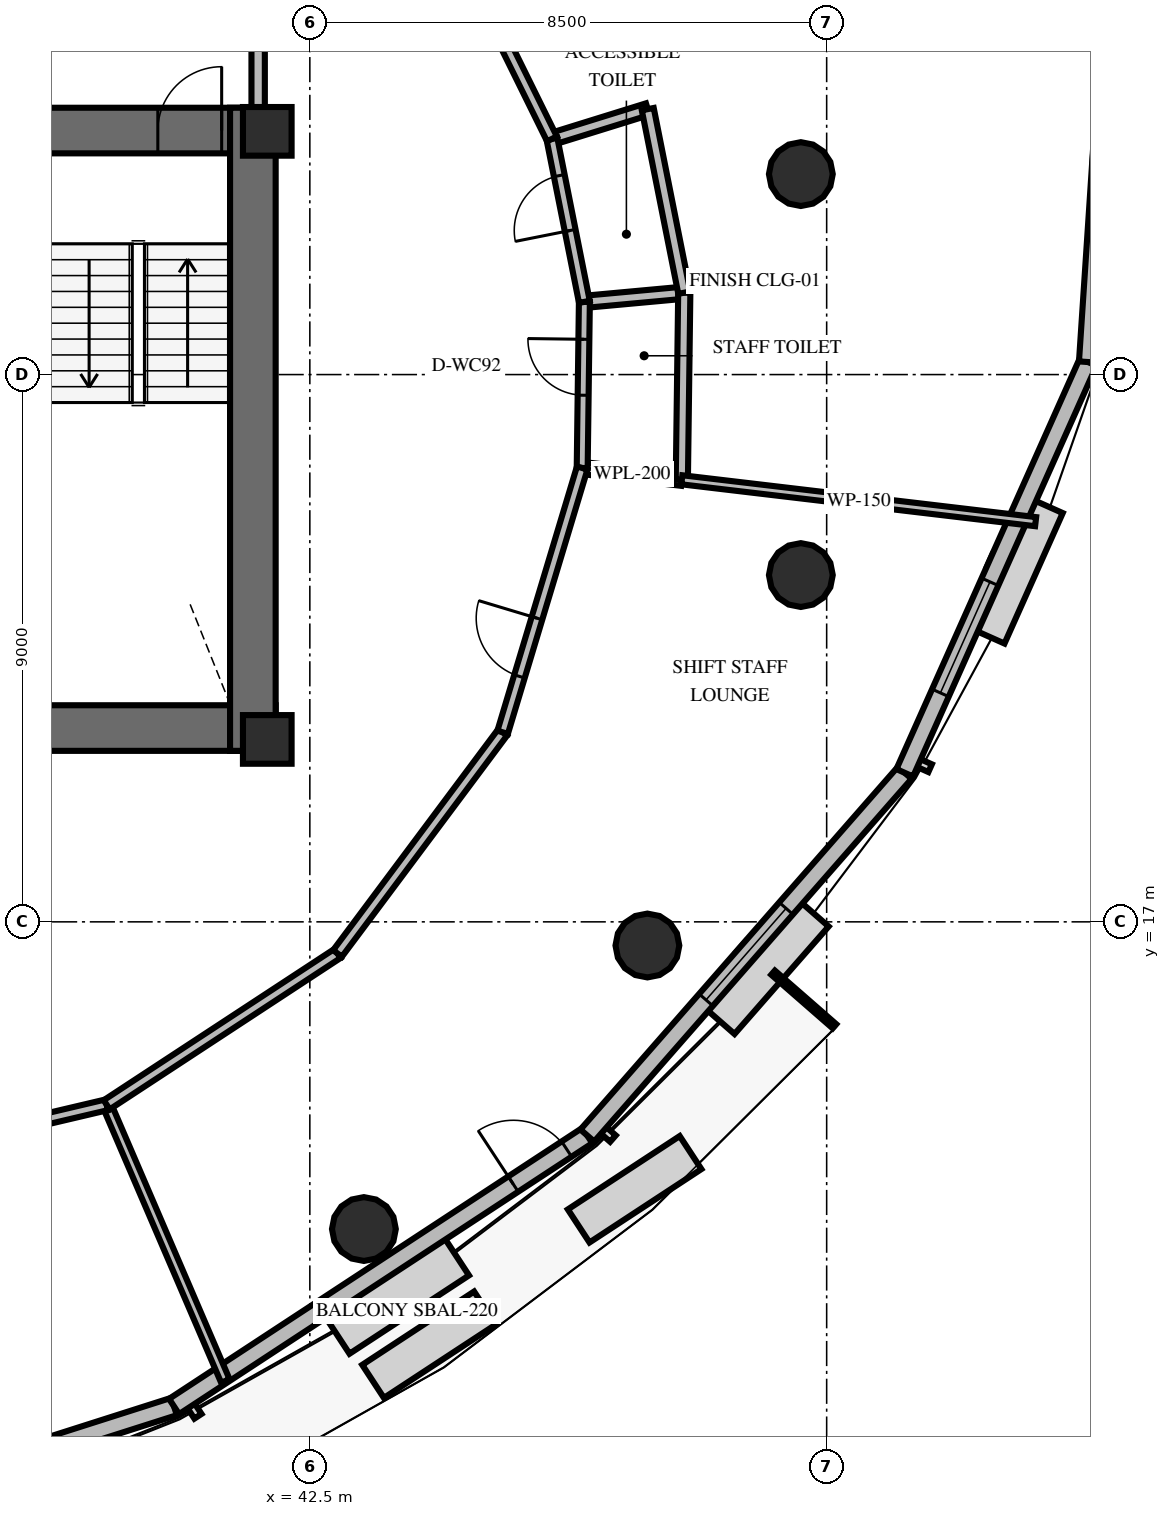
"""IFC4 building model, lengths in metres.
Left out: names, types, materials, properties, quantities, classifications, styles, units other than length and angle.
Written with IfcOpenShell. Run it as: python <this file> out.ifc"""

import sys

from ifc_helpers import new_model, si_unit, direction, frame, frame_2d, origin, origin_2d, place, context, subcontext, project, spatial, rectangle, circle, extrude, element, fill, save


model = new_model("IFC4")
c1 = context("Model", 3, precision=1e-05, world=origin(), true_north=direction((0.0, 1.0)))
c2 = subcontext(c1, "Body", "Model", "MODEL_VIEW")
j1 = project(units=[si_unit("LENGTHUNIT", "METRE"), si_unit("PLANEANGLEUNIT", "RADIAN")], contexts=[c1])
p1 = place(None, origin())
s1 = spatial("IfcSite", under=j1, at=p1, CompositionType="ELEMENT")
p2 = place(p1, origin())
s2 = spatial("IfcBuilding", under=s1, at=p2, CompositionType="ELEMENT")
p3 = place(p2, frame((0.0, 0.0, 173.6)))
s3 = spatial("IfcBuildingStorey", under=s2, at=p3, CompositionType="ELEMENT", Elevation=173.6)
p4 = place(p3, frame((26.072, 20.187, 0.0), z_axis=(0.0, 0.0, 1.0), x_axis=(1.0, 0.0, 0.0)))
e1 = element("IfcWall", 1, at=p4, inside=s3, PredefinedType="SHEAR", context=c2, shape_type="SweptSolid", body=[
    extrude(rectangle(XDim=15.866, YDim=0.75, at=frame_2d((7.933, 0.0))), origin(), (0.0, 0.0, 1.0), 3.6),
])
p5 = place(p3, frame((26.072, 30.013, 0.0), z_axis=(0.0, 0.0, 1.0), x_axis=(1.0, 0.0, 0.0)))
e2 = element("IfcWall", 2, at=p5, inside=s3, PredefinedType="SHEAR", context=c2, shape_type="SweptSolid", body=[
    extrude(rectangle(XDim=15.866, YDim=0.75, at=frame_2d((7.933, 0.0))), origin(), (0.0, 0.0, 1.0), 3.6),
])
p6 = place(p5, frame((0.878, 0.0, 0.0)))
e3 = element("IfcOpeningElement", 3, at=p6, cuts=e2, PredefinedType="OPENING", context=c2, shape_type="SweptSolid", body=[
    extrude(rectangle(XDim=1.05, YDim=2.15, at=frame_2d((0.525, 1.075))), frame((0.0, 0.385, 0.0), z_axis=(0.0, -1.0, 0.0), x_axis=(1.0, 0.0, 0.0)), (0.0, 0.0, 1.0), 0.77),
])
p7 = place(p5, frame((13.928, 0.0, 0.0)))
e4 = element("IfcOpeningElement", 4, at=p7, cuts=e2, PredefinedType="OPENING", context=c2, shape_type="SweptSolid", body=[
    extrude(rectangle(XDim=1.05, YDim=2.15, at=frame_2d((0.525, 1.075))), frame((0.0, 0.385, 0.0), z_axis=(0.0, -1.0, 0.0), x_axis=(1.0, 0.0, 0.0)), (0.0, 0.0, 1.0), 0.77),
])
p8 = place(p5, frame((7.378, 0.0, 0.0)))
e5 = element("IfcOpeningElement", 5, at=p8, cuts=e2, PredefinedType="OPENING", context=c2, shape_type="SweptSolid", body=[
    extrude(rectangle(XDim=1.1, YDim=2.15, at=frame_2d((0.55, 1.075))), frame((0.0, 0.385, 0.0), z_axis=(0.0, -1.0, 0.0), x_axis=(1.0, 0.0, 0.0)), (0.0, 0.0, 1.0), 0.77),
])
p9 = place(p3, frame((41.563, 19.812, 0.0), z_axis=(0.0, 0.0, 1.0), x_axis=(0.0, 1.0, 0.0)))
e6 = element("IfcWall", 6, at=p9, inside=s3, PredefinedType="SHEAR", context=c2, shape_type="SweptSolid", body=[
    extrude(rectangle(XDim=10.576, YDim=0.75, at=frame_2d((5.288, 0.0))), origin(), (0.0, 0.0, 1.0), 3.6),
])
for number, where, z_axis, x_axis in (
    (7, (41.8, 20.0, 0.0), (0.0, 0.0, 1.0), (1.0, 0.0, 0.0)),
    (8, (41.8, 30.0, 0.0), (0.0, 0.0, 1.0), (1.0, 0.0, 0.0)),
):
    element("IfcColumn", number, at=place(p3, frame(where, z_axis=z_axis, x_axis=x_axis)), inside=s3, PredefinedType="PILASTER", context=c2, shape_type="SweptSolid", body=[
        extrude(rectangle(XDim=0.8, YDim=0.8, at=origin_2d()), origin(), (0.0, 0.0, 1.0), 3.6),
    ])
for number, where, z_axis, x_axis in (
    (9, (50.575, 29.297, 0.0), (0.0, 0.0, 1.0), (1.0, 0.0, 0.0)),
    (10, (43.389, 11.948, 0.0), (0.0, 0.0, 1.0), (1.0, 0.0, 0.0)),
    (11, (48.052, 16.611, 0.0), (0.0, 0.0, 1.0), (1.0, 0.0, 0.0)),
    (12, (50.575, 22.703, 0.0), (0.0, 0.0, 1.0), (1.0, 0.0, 0.0)),
):
    element("IfcColumn", number, at=place(p3, frame(where, z_axis=z_axis, x_axis=x_axis)), inside=s3, PredefinedType="COLUMN", context=c2, shape_type="SweptSolid", body=[
        extrude(circle(Radius=0.525, at=origin_2d()), origin(), (0.0, 0.0, 1.0), 3.6),
    ])
p10 = place(p3, frame((32.715, 6.621, 0.0), z_axis=(0.0, 0.0, 1.0), x_axis=(0.952705891998, 0.303893868566, 0.0)))
e13 = element("IfcWall", 13, at=p10, inside=s3, PredefinedType="SOLIDWALL", context=c2, shape_type="SweptSolid", body=[
    extrude(rectangle(XDim=7.927, YDim=0.3, at=frame_2d((3.963, 0.0))), origin(), (0.0, 0.0, 1.0), 2.66),
])
p11 = place(p10, frame((2.964, 0.0, 0.8)))
e14 = element("IfcOpeningElement", 14, at=p11, cuts=e13, PredefinedType="OPENING", context=c2, shape_type="SweptSolid", body=[
    extrude(rectangle(XDim=2.0, YDim=1.85, at=frame_2d((1.0, 0.925))), frame((0.0, 0.16, 0.0), z_axis=(0.0, -1.0, 0.0), x_axis=(1.0, 0.0, 0.0)), (0.0, 0.0, 1.0), 0.32),
])
p12 = place(p3, frame((40.267, 9.03, 0.0), z_axis=(0.0, 0.0, 1.0), x_axis=(0.836291563278, 0.54828498173, 0.0)))
e15 = element("IfcWall", 15, at=p12, inside=s3, PredefinedType="SOLIDWALL", context=c2, shape_type="SweptSolid", body=[
    extrude(rectangle(XDim=8.127, YDim=0.3, at=frame_2d((4.063, 0.0))), origin(), (0.0, 0.0, 1.0), 2.66),
])
p13 = place(p12, frame((6.67, 0.0, 0.0)))
e16 = element("IfcOpeningElement", 16, at=p13, cuts=e15, PredefinedType="OPENING", context=c2, shape_type="SweptSolid", body=[
    extrude(rectangle(XDim=1.05, YDim=2.15, at=frame_2d((0.525, 1.075))), frame((0.0, 0.16, 0.0), z_axis=(0.0, -1.0, 0.0), x_axis=(1.0, 0.0, 0.0)), (0.0, 0.0, 1.0), 0.32),
])
p14 = place(p3, frame((47.063, 13.486, 0.0), z_axis=(0.0, 0.0, 1.0), x_axis=(0.658594000486, 0.752498466792, 0.0)))
e17 = element("IfcWall", 17, at=p14, inside=s3, PredefinedType="SOLIDWALL", context=c2, shape_type="SweptSolid", body=[
    extrude(rectangle(XDim=7.927, YDim=0.3, at=frame_2d((3.963, 0.0))), origin(), (0.0, 0.0, 1.0), 2.66),
])
p15 = place(p14, frame((2.964, 0.0, 0.8)))
e18 = element("IfcOpeningElement", 18, at=p15, cuts=e17, PredefinedType="OPENING", context=c2, shape_type="SweptSolid", body=[
    extrude(rectangle(XDim=2.0, YDim=1.85, at=frame_2d((1.0, 0.925))), frame((0.0, 0.16, 0.0), z_axis=(0.0, -1.0, 0.0), x_axis=(1.0, 0.0, 0.0)), (0.0, 0.0, 1.0), 0.32),
])
p16 = place(p3, frame((52.284, 19.451, 0.0), z_axis=(0.0, 0.0, 1.0), x_axis=(0.407577130337, 0.913170785136, 0.0)))
e19 = element("IfcWall", 19, at=p16, inside=s3, PredefinedType="SOLIDWALL", context=c2, shape_type="SweptSolid", body=[
    extrude(rectangle(XDim=7.398, YDim=0.3, at=frame_2d((3.699, 0.0))), origin(), (0.0, 0.0, 1.0), 2.66),
])
p17 = place(p16, frame((1.439, 0.0, 0.8)))
e20 = element("IfcOpeningElement", 20, at=p17, cuts=e19, PredefinedType="OPENING", context=c2, shape_type="SweptSolid", body=[
    extrude(rectangle(XDim=2.0, YDim=1.85, at=frame_2d((1.0, 0.925))), frame((0.0, 0.16, 0.0), z_axis=(0.0, -1.0, 0.0), x_axis=(1.0, 0.0, 0.0)), (0.0, 0.0, 1.0), 0.32),
])
p18 = place(p3, frame((55.299, 26.206, 0.0), z_axis=(0.0, 0.0, 1.0), x_axis=(0.066168247178, 0.997808480153, 0.0)))
e21 = element("IfcWall", 21, at=p18, inside=s3, PredefinedType="SOLIDWALL", context=c2, shape_type="SweptSolid", body=[
    extrude(rectangle(XDim=6.745, YDim=0.3, at=frame_2d((3.373, 0.0))), origin(), (0.0, 0.0, 1.0), 2.66),
])
p19 = place(p18, frame((2.372, 0.0, 0.8)))
e22 = element("IfcOpeningElement", 22, at=p19, cuts=e21, PredefinedType="OPENING", context=c2, shape_type="SweptSolid", body=[
    extrude(rectangle(XDim=2.0, YDim=1.85, at=frame_2d((1.0, 0.925))), frame((0.0, 0.16, 0.0), z_axis=(0.0, -1.0, 0.0), x_axis=(1.0, 0.0, 0.0)), (0.0, 0.0, 1.0), 0.32),
])
p20 = place(p3, frame((41.65, 30.05, 0.0), z_axis=(0.0, 0.0, 1.0), x_axis=(0.0, 1.0, 0.0)))
e23 = element("IfcWall", 23, at=p20, inside=s3, PredefinedType="SOLIDWALL", context=c2, shape_type="SweptSolid", body=[
    extrude(rectangle(XDim=4.38, YDim=0.22, at=frame_2d((2.19, 0.0))), origin(), (0.0, 0.0, 1.0), 2.46),
])
for number, where, z_axis, x_axis in (
    (24, (46.979, 24.464, 0.0), (0.0, 0.0, 1.0), (0.993, -0.118, 0.0)),
    (25, (47.015, 27.196, 0.0), (0.0, 0.0, 1.0), (0.996, 0.092, 0.0)),
):
    element("IfcWall", number, at=place(p3, frame(where, z_axis=z_axis, x_axis=x_axis)), inside=s3, PredefinedType="PLUMBINGWALL", context=c2, shape_type="SweptSolid", body=[
        extrude(rectangle(XDim=1.65, YDim=0.2, at=frame_2d((0.825, 0.0))), origin(), (0.0, 0.0, 1.0), 2.46),
    ])
p21 = place(p3, frame((48.618, 24.27, 0.0), z_axis=(0.0, 0.0, 1.0), x_axis=(0.013089960589, 0.999914322796, 0.0)))
e26 = element("IfcWall", 26, at=p21, inside=s3, PredefinedType="PLUMBINGWALL", context=c2, shape_type="SweptSolid", body=[
    extrude(rectangle(XDim=3.077, YDim=0.2, at=frame_2d((1.539, 0.0))), origin(), (0.0, 0.0, 1.0), 2.46),
])
p22 = place(p3, frame((46.979, 24.464, 0.0), z_axis=(0.0, 0.0, 1.0), x_axis=(0.013046253309, 0.999914894016, 0.0)))
e27 = element("IfcWall", 27, at=p22, inside=s3, PredefinedType="PARTITIONING", context=c2, shape_type="SweptSolid", body=[
    extrude(rectangle(XDim=2.732, YDim=0.18, at=frame_2d((1.366, 0.0))), origin(), (0.0, 0.0, 1.0), 2.46),
])
p23 = place(p22, frame((1.197, 0.0, 0.0)))
e28 = element("IfcOpeningElement", 28, at=p23, cuts=e27, PredefinedType="OPENING", context=c2, shape_type="SweptSolid", body=[
    extrude(rectangle(XDim=0.92, YDim=2.1, at=frame_2d((0.46, 1.05))), frame((0.0, 0.1, 0.0), z_axis=(0.0, -1.0, 0.0), x_axis=(1.0, 0.0, 0.0)), (0.0, 0.0, 1.0), 0.2),
])
p24 = place(p3, frame((46.482, 29.876, 0.0), z_axis=(0.0, 0.0, 1.0), x_axis=(0.955020793809, 0.296538839602, 0.0)))
e29 = element("IfcWall", 29, at=p24, inside=s3, PredefinedType="PLUMBINGWALL", context=c2, shape_type="SweptSolid", body=[
    extrude(rectangle(XDim=1.65, YDim=0.2, at=frame_2d((0.825, 0.0))), origin(), (0.0, 0.0, 1.0), 2.46),
])
p25 = place(p3, frame((48.658, 27.347, 0.0), z_axis=(0.0, 0.0, 1.0), x_axis=(-0.195093780369, 0.980784592488, 0.0)))
e30 = element("IfcWall", 30, at=p25, inside=s3, PredefinedType="PLUMBINGWALL", context=c2, shape_type="SweptSolid", body=[
    extrude(rectangle(XDim=3.077, YDim=0.2, at=frame_2d((1.539, 0.0))), origin(), (0.0, 0.0, 1.0), 2.46),
])
p26 = place(p3, frame((47.015, 27.196, 0.0), z_axis=(0.0, 0.0, 1.0), x_axis=(-0.195050694418, 0.98079316199, 0.0)))
e31 = element("IfcWall", 31, at=p26, inside=s3, PredefinedType="PARTITIONING", context=c2, shape_type="SweptSolid", body=[
    extrude(rectangle(XDim=2.732, YDim=0.18, at=frame_2d((1.366, 0.0))), origin(), (0.0, 0.0, 1.0), 2.46),
])
p27 = place(p26, frame((1.197, 0.0, 0.0)))
e32 = element("IfcOpeningElement", 32, at=p27, cuts=e31, PredefinedType="OPENING", context=c2, shape_type="SweptSolid", body=[
    extrude(rectangle(XDim=0.92, YDim=2.1, at=frame_2d((0.46, 1.05))), frame((0.0, 0.1, 0.0), z_axis=(0.0, -1.0, 0.0), x_axis=(1.0, 0.0, 0.0)), (0.0, 0.0, 1.0), 0.2),
])
p28 = place(p3, frame((48.618, 24.27, 0.0), z_axis=(0.0, 0.0, 1.0), x_axis=(0.993073026806, -0.117498780548, 0.0)))
e33 = element("IfcWall", 33, at=p28, inside=s3, PredefinedType="PARTITIONING", context=c2, shape_type="SweptSolid", body=[
    extrude(rectangle(XDim=5.859, YDim=0.15, at=frame_2d((2.93, 0.0))), origin(), (0.0, 0.0, 1.0), 2.46),
])
p29 = place(p3, frame((46.482, 29.876, 0.0), z_axis=(0.0, 0.0, 1.0), x_axis=(-0.442287221149, 0.896873465996, 0.0)))
e34 = element("IfcWall", 34, at=p29, inside=s3, PredefinedType="PARTITIONING", context=c2, shape_type="SweptSolid", body=[
    extrude(rectangle(XDim=4.089, YDim=0.18, at=frame_2d((2.044, 0.0))), origin(), (0.0, 0.0, 1.0), 2.46),
])
p30 = place(p3, frame((39.159, 13.991, 0.0), z_axis=(0.0, 0.0, 1.0), x_axis=(0.394765555281, -0.918781887264, 0.0)))
e35 = element("IfcWall", 35, at=p30, inside=s3, PredefinedType="PARTITIONING", context=c2, shape_type="SweptSolid", body=[
    extrude(rectangle(XDim=4.943, YDim=0.15, at=frame_2d((2.472, 0.0))), origin(), (0.0, 0.0, 1.0), 2.46),
])
p31 = place(p3, frame((34.741, 12.951, 0.0), z_axis=(0.0, 0.0, 1.0), x_axis=(0.973370592217, 0.229237192022, 0.0)))
e36 = element("IfcWall", 36, at=p31, inside=s3, PredefinedType="PARTITIONING", context=c2, shape_type="SweptSolid", body=[
    extrude(rectangle(XDim=4.539, YDim=0.18, at=frame_2d((2.27, 0.0))), origin(), (0.0, 0.0, 1.0), 2.46),
])
p32 = place(p3, frame((39.159, 13.991, 0.0), z_axis=(0.0, 0.0, 1.0), x_axis=(0.836295307945, 0.548279269998, 0.0)))
e37 = element("IfcWall", 37, at=p32, inside=s3, PredefinedType="PARTITIONING", context=c2, shape_type="SweptSolid", body=[
    extrude(rectangle(XDim=4.539, YDim=0.18, at=frame_2d((2.27, 0.0))), origin(), (0.0, 0.0, 1.0), 2.46),
])
p33 = place(p3, frame((42.955, 16.48, 0.0), z_axis=(0.0, 0.0, 1.0), x_axis=(0.598320542487, 0.80125684299, 0.0)))
e38 = element("IfcWall", 38, at=p33, inside=s3, PredefinedType="PARTITIONING", context=c2, shape_type="SweptSolid", body=[
    extrude(rectangle(XDim=4.539, YDim=0.18, at=frame_2d((2.27, 0.0))), origin(), (0.0, 0.0, 1.0), 2.46),
])
p34 = place(p3, frame((45.671, 20.117, 0.0), z_axis=(0.0, 0.0, 1.0), x_axis=(0.288226064997, 0.957562392461, 0.0)))
e39 = element("IfcWall", 39, at=p34, inside=s3, PredefinedType="PARTITIONING", context=c2, shape_type="SweptSolid", body=[
    extrude(rectangle(XDim=4.539, YDim=0.18, at=frame_2d((2.27, 0.0))), origin(), (0.0, 0.0, 1.0), 2.46),
])
p35 = place(p34, frame((0.96, 0.0, 0.0)))
e40 = element("IfcOpeningElement", 40, at=p35, cuts=e39, PredefinedType="OPENING", context=c2, shape_type="SweptSolid", body=[
    extrude(rectangle(XDim=1.0, YDim=2.15, at=frame_2d((0.5, 1.075))), frame((0.0, 0.1, 0.0), z_axis=(0.0, -1.0, 0.0), x_axis=(1.0, 0.0, 0.0)), (0.0, 0.0, 1.0), 0.2),
])
p36 = place(p13, origin())
e41 = element("IfcDoor", 41, at=p36, inside=s3, OperationType="SINGLE_SWING_LEFT", PredefinedType="DOOR", context=c2, shape_type="SweptSolid", body=[
    extrude(rectangle(XDim=1.05, YDim=2.15, at=frame_2d((0.525, 1.075))), frame((0.0, 0.025, 0.0), z_axis=(0.0, -1.0, 0.0), x_axis=(1.0, 0.0, 0.0)), (0.0, 0.0, 1.0), 0.05),
])
fill(e16, e41)
p37 = place(p15, origin())
e42 = element("IfcWindow", 42, at=p37, inside=s3, PartitioningType="SINGLE_PANEL", PredefinedType="WINDOW", context=c2, shape_type="SweptSolid", body=[
    extrude(rectangle(XDim=2.0, YDim=1.85, at=frame_2d((1.0, 0.925))), frame((0.0, 0.03, 0.0), z_axis=(0.0, -1.0, 0.0), x_axis=(1.0, 0.0, 0.0)), (0.0, 0.0, 1.0), 0.06),
])
fill(e18, e42)
p38 = place(p17, origin())
e43 = element("IfcWindow", 43, at=p38, inside=s3, PartitioningType="SINGLE_PANEL", PredefinedType="WINDOW", context=c2, shape_type="SweptSolid", body=[
    extrude(rectangle(XDim=2.0, YDim=1.85, at=frame_2d((1.0, 0.925))), frame((0.0, 0.03, 0.0), z_axis=(0.0, -1.0, 0.0), x_axis=(1.0, 0.0, 0.0)), (0.0, 0.0, 1.0), 0.06),
])
fill(e20, e43)
p39 = place(p7, origin())
e44 = element("IfcDoor", 44, at=p39, inside=s3, OperationType="SINGLE_SWING_RIGHT", PredefinedType="DOOR", context=c2, shape_type="SweptSolid", body=[
    extrude(rectangle(XDim=1.05, YDim=2.15, at=frame_2d((0.525, 1.075))), frame((0.0, 0.025, 0.0), z_axis=(0.0, -1.0, 0.0), x_axis=(1.0, 0.0, 0.0)), (0.0, 0.0, 1.0), 0.05),
])
fill(e4, e44)
p40 = place(p23, origin())
e45 = element("IfcDoor", 45, at=p40, inside=s3, OperationType="SINGLE_SWING_RIGHT", PredefinedType="DOOR", context=c2, shape_type="SweptSolid", body=[
    extrude(rectangle(XDim=0.92, YDim=2.1, at=frame_2d((0.46, 1.05))), frame((0.0, 0.025, 0.0), z_axis=(0.0, -1.0, 0.0), x_axis=(1.0, 0.0, 0.0)), (0.0, 0.0, 1.0), 0.05),
])
fill(e28, e45)
p41 = place(p27, origin())
e46 = element("IfcDoor", 46, at=p41, inside=s3, OperationType="SINGLE_SWING_LEFT", PredefinedType="DOOR", context=c2, shape_type="SweptSolid", body=[
    extrude(rectangle(XDim=0.92, YDim=2.1, at=frame_2d((0.46, 1.05))), frame((0.0, 0.025, 0.0), z_axis=(0.0, -1.0, 0.0), x_axis=(1.0, 0.0, 0.0)), (0.0, 0.0, 1.0), 0.05),
])
fill(e32, e46)
p42 = place(p35, origin())
e47 = element("IfcDoor", 47, at=p42, inside=s3, OperationType="SINGLE_SWING_RIGHT", PredefinedType="DOOR", context=c2, shape_type="SweptSolid", body=[
    extrude(rectangle(XDim=1.0, YDim=2.15, at=frame_2d((0.5, 1.075))), frame((0.0, 0.025, 0.0), z_axis=(0.0, -1.0, 0.0), x_axis=(1.0, 0.0, 0.0)), (0.0, 0.0, 1.0), 0.05),
])
fill(e40, e47)
save(model, sys.argv[1])
